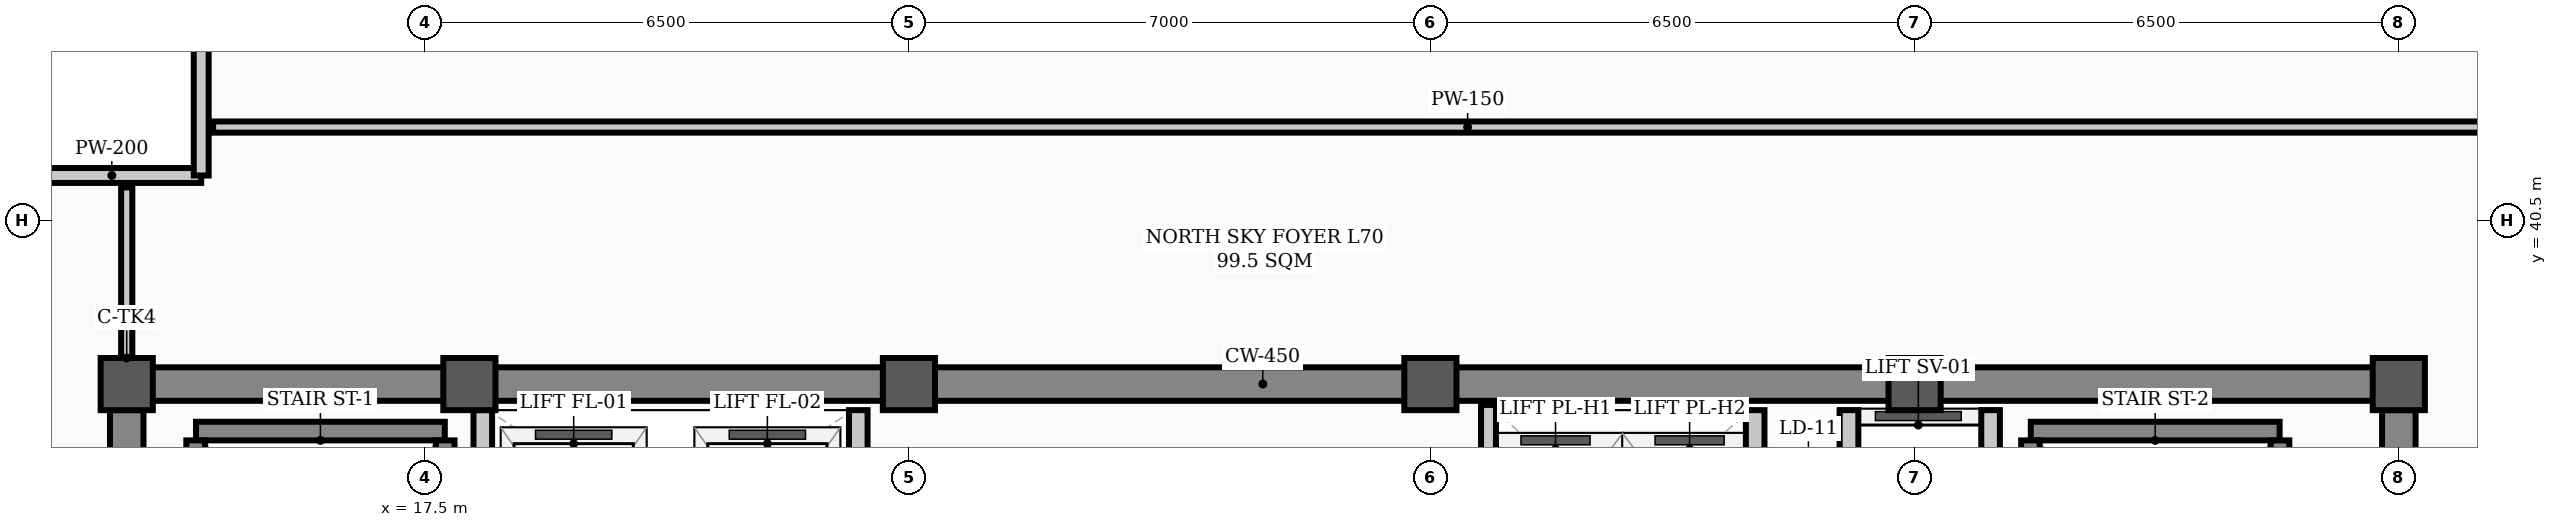
"""IFC4 building model, lengths in metres.
Left out: names, types, materials, properties, quantities, classifications, styles, units other than length and angle.
Written with IfcOpenShell. Run it as: python <this file> out.ifc"""

import sys

from ifc_helpers import new_model, si_unit, direction, frame, frame_2d, origin, origin_2d, place, context, subcontext, project, spatial, rectangle, hollow_rectangle, extrude, element, save


model = new_model("IFC4")
c1 = context("Model", 3, precision=1e-05, world=origin(), true_north=direction((0.0, 1.0)))
c2 = subcontext(c1, "Body", "Model", "MODEL_VIEW")
j1 = project(units=[si_unit("LENGTHUNIT", "METRE"), si_unit("PLANEANGLEUNIT", "RADIAN")], contexts=[c1])
p1 = place(None, origin())
s1 = spatial("IfcSite", under=j1, at=p1, CompositionType="ELEMENT")
p2 = place(p1, origin())
s2 = spatial("IfcBuilding", under=s1, at=p2, CompositionType="ELEMENT")
p3 = place(p2, frame((0.0, 0.0, 281.3)))
s3 = spatial("IfcBuildingStorey", under=s2, at=p3, CompositionType="ELEMENT", Elevation=281.3)
for number, where, z_axis, x_axis in (
    (1, (13.5, 38.3, 0.0), (0.0, 0.0, 1.0), (1.0, 0.0, 0.0)),
    (2, (18.1, 38.3, 0.0), (0.0, 0.0, 1.0), (1.0, 0.0, 0.0)),
    (3, (24.0, 38.3, 0.0), (0.0, 0.0, 1.0), (1.0, 0.0, 0.0)),
    (4, (31.0, 38.3, 0.0), (0.0, 0.0, 1.0), (1.0, 0.0, 0.0)),
    (5, (37.5, 38.3, 0.0), (0.0, 0.0, 1.0), (1.0, 0.0, 0.0)),
    (6, (44.0, 38.3, 0.0), (0.0, 0.0, 1.0), (1.0, 0.0, 0.0)),
):
    element("IfcColumn", number, at=place(p3, frame(where, z_axis=z_axis, x_axis=x_axis)), inside=s3, PredefinedType="COLUMN", context=c2, shape_type="SweptSolid", body=[
        extrude(hollow_rectangle(XDim=0.7, YDim=0.7, WallThickness=0.028, InnerFilletRadius=0.014, OuterFilletRadius=0.042, at=origin_2d()), origin(), (0.0, 0.0, 1.0), 3.9),
    ])
for number, where, z_axis, x_axis in (
    (7, (12.1, 41.1, 0.0), (0.0, 0.0, 1.0), (1.0, 0.0, 0.0)),
    (8, (14.5, 41.1, 0.0), (0.0, 0.0, 1.0), (0.0, 1.0, 0.0)),
):
    element("IfcWall", number, at=place(p3, frame(where, z_axis=z_axis, x_axis=x_axis)), inside=s3, PredefinedType="PARAPET", context=c2, shape_type="SweptSolid", body=[
        extrude(rectangle(XDim=2.4, YDim=0.2, at=frame_2d((1.2, 0.0))), origin(), (0.0, 0.0, 1.0), 1.2),
    ])
p4 = place(p3, frame((13.5, 38.3, 0.0), z_axis=(0.0, 0.0, 1.0), x_axis=(1.0, 0.0, 0.0)))
e9 = element("IfcWall", 9, at=p4, inside=s3, PredefinedType="SHEAR", context=c2, shape_type="SweptSolid", body=[
    extrude(rectangle(XDim=30.5, YDim=0.45, at=frame_2d((15.25, 0.0))), origin(), (0.0, 0.0, 1.0), 3.72),
])
for number, where, z_axis, x_axis in (
    (10, (13.5, 29.35, 0.0), (0.0, 0.0, 1.0), (0.0, 1.0, 0.0)),
    (11, (44.0, 29.35, 0.0), (0.0, 0.0, 1.0), (0.0, 1.0, 0.0)),
):
    element("IfcWall", number, at=place(p3, frame(where, z_axis=z_axis, x_axis=x_axis)), inside=s3, PredefinedType="SHEAR", context=c2, shape_type="SweptSolid", body=[
        extrude(rectangle(XDim=8.6, YDim=0.45, at=frame_2d((4.3, 0.0))), origin(), (0.0, 0.0, 1.0), 3.72),
    ])
p5 = place(p3, frame((14.43, 37.669, 0.0), z_axis=(0.0, 0.0, 1.0), x_axis=(1.0, 0.0, 0.0)))
e12 = element("IfcWall", 12, at=p5, inside=s3, PredefinedType="STANDARD", context=c2, shape_type="SweptSolid", body=[
    extrude(rectangle(XDim=3.34, YDim=0.25, at=frame_2d((1.67, 0.0))), origin(), (0.0, 0.0, 1.0), 3.72),
])
for number, where, z_axis, x_axis in (
    (13, (14.425, 30.36, 0.0), (0.0, 0.0, 1.0), (0.0, 1.0, 0.0)),
    (14, (17.775, 30.36, 0.0), (0.0, 0.0, 1.0), (0.0, 1.0, 0.0)),
):
    element("IfcWall", number, at=place(p3, frame(where, z_axis=z_axis, x_axis=x_axis)), inside=s3, PredefinedType="STANDARD", context=c2, shape_type="SweptSolid", body=[
        extrude(rectangle(XDim=7.184, YDim=0.25, at=frame_2d((3.592, 0.0))), origin(), (0.0, 0.0, 1.0), 3.72),
    ])
p6 = place(p3, frame((39.06, 37.669, 0.0), z_axis=(0.0, 0.0, 1.0), x_axis=(1.0, 0.0, 0.0)))
e15 = element("IfcWall", 15, at=p6, inside=s3, PredefinedType="STANDARD", context=c2, shape_type="SweptSolid", body=[
    extrude(rectangle(XDim=3.34, YDim=0.25, at=frame_2d((1.67, 0.0))), origin(), (0.0, 0.0, 1.0), 3.72),
])
for number, where, z_axis, x_axis in (
    (16, (39.055, 30.36, 0.0), (0.0, 0.0, 1.0), (0.0, 1.0, 0.0)),
    (17, (42.405, 30.36, 0.0), (0.0, 0.0, 1.0), (0.0, 1.0, 0.0)),
):
    element("IfcWall", number, at=place(p3, frame(where, z_axis=z_axis, x_axis=x_axis)), inside=s3, PredefinedType="STANDARD", context=c2, shape_type="SweptSolid", body=[
        extrude(rectangle(XDim=7.184, YDim=0.25, at=frame_2d((3.592, 0.0))), origin(), (0.0, 0.0, 1.0), 3.72),
    ])
p7 = place(p3, frame((36.62, 31.95, 0.0), z_axis=(0.0, 0.0, 1.0), x_axis=(0.0, 1.0, 0.0)))
e18 = element("IfcWall", 18, at=p7, inside=s3, PredefinedType="STANDARD", context=c2, shape_type="SweptSolid", body=[
    extrude(rectangle(XDim=6.0, YDim=0.25, at=frame_2d((3.0, 0.0))), origin(), (0.0, 0.0, 1.0), 3.4),
])
p8 = place(p7, frame((0.9, 0.0, 0.0)))
e19 = element("IfcOpeningElement", 19, at=p8, cuts=e18, PredefinedType="OPENING", context=c2, shape_type="SweptSolid", body=[
    extrude(rectangle(XDim=1.1, YDim=2.08, at=frame_2d((0.55, 1.04))), frame((0.0, 0.135, 0.0), z_axis=(0.0, -1.0, 0.0), x_axis=(1.0, 0.0, 0.0)), (0.0, 0.0, 1.0), 0.27),
])
p9 = place(p7, frame((4.0, 0.0, 0.0)))
e20 = element("IfcOpeningElement", 20, at=p9, cuts=e18, PredefinedType="OPENING", context=c2, shape_type="SweptSolid", body=[
    extrude(rectangle(XDim=1.1, YDim=2.08, at=frame_2d((0.55, 1.04))), frame((0.0, 0.135, 0.0), z_axis=(0.0, -1.0, 0.0), x_axis=(1.0, 0.0, 0.0)), (0.0, 0.0, 1.0), 0.27),
])
p10 = place(p3, frame((38.52, 31.95, 0.0), z_axis=(0.0, 0.0, 1.0), x_axis=(0.0, 1.0, 0.0)))
e21 = element("IfcWall", 21, at=p10, inside=s3, PredefinedType="STANDARD", context=c2, shape_type="SweptSolid", body=[
    extrude(rectangle(XDim=6.0, YDim=0.25, at=frame_2d((3.0, 0.0))), origin(), (0.0, 0.0, 1.0), 3.4),
])
for number, where, z_axis, x_axis in (
    (22, (18.28, 34.62, 0.0), (0.0, 0.0, 1.0), (0.0, 1.0, 0.0)),
    (23, (23.32, 34.62, 0.0), (0.0, 0.0, 1.0), (0.0, 1.0, 0.0)),
):
    element("IfcWall", number, at=place(p3, frame(where, z_axis=z_axis, x_axis=x_axis)), inside=s3, PredefinedType="STANDARD", context=c2, shape_type="SweptSolid", body=[
        extrude(rectangle(XDim=3.33, YDim=0.25, at=frame_2d((1.665, 0.0))), origin(), (0.0, 0.0, 1.0), 3.72),
    ])
p11 = place(p3, frame((35.36, 34.9, 0.0), z_axis=(0.0, 0.0, 1.0), x_axis=(0.0, 1.0, 0.0)))
e24 = element("IfcWall", 24, at=p11, inside=s3, PredefinedType="STANDARD", context=c2, shape_type="SweptSolid", body=[
    extrude(rectangle(XDim=3.05, YDim=0.25, at=frame_2d((1.525, 0.0))), origin(), (0.0, 0.0, 1.0), 3.4),
])
p12 = place(p3, frame((14.66, 41.75, 0.0), z_axis=(0.0, 0.0, 1.0), x_axis=(1.0, 0.0, 0.0)))
e25 = element("IfcWall", 25, at=p12, inside=s3, PredefinedType="PARTITIONING", context=c2, shape_type="SweptSolid", body=[
    extrude(rectangle(XDim=33.68, YDim=0.15, at=frame_2d((16.84, 0.0))), origin(), (0.0, 0.0, 1.0), 3.2),
])
p13 = place(p3, frame((13.5, 38.535, 0.0), z_axis=(0.0, 0.0, 1.0), x_axis=(0.0, 1.0, 0.0)))
e26 = element("IfcWall", 26, at=p13, inside=s3, PredefinedType="PARTITIONING", context=c2, shape_type="SweptSolid", body=[
    extrude(rectangle(XDim=2.405, YDim=0.15, at=frame_2d((1.203, 0.0))), origin(), (0.0, 0.0, 1.0), 3.72),
])
p14 = place(p3, frame((31.78, 34.9, 0.0), z_axis=(0.0, 0.0, 1.0), x_axis=(0.0, 1.0, 0.0)))
e27 = element("IfcWall", 27, at=p14, inside=s3, PredefinedType="STANDARD", context=c2, shape_type="SweptSolid", body=[
    extrude(rectangle(XDim=3.12, YDim=0.2, at=frame_2d((1.56, 0.0))), origin(), (0.0, 0.0, 1.0), 3.4),
])
save(model, sys.argv[1])
